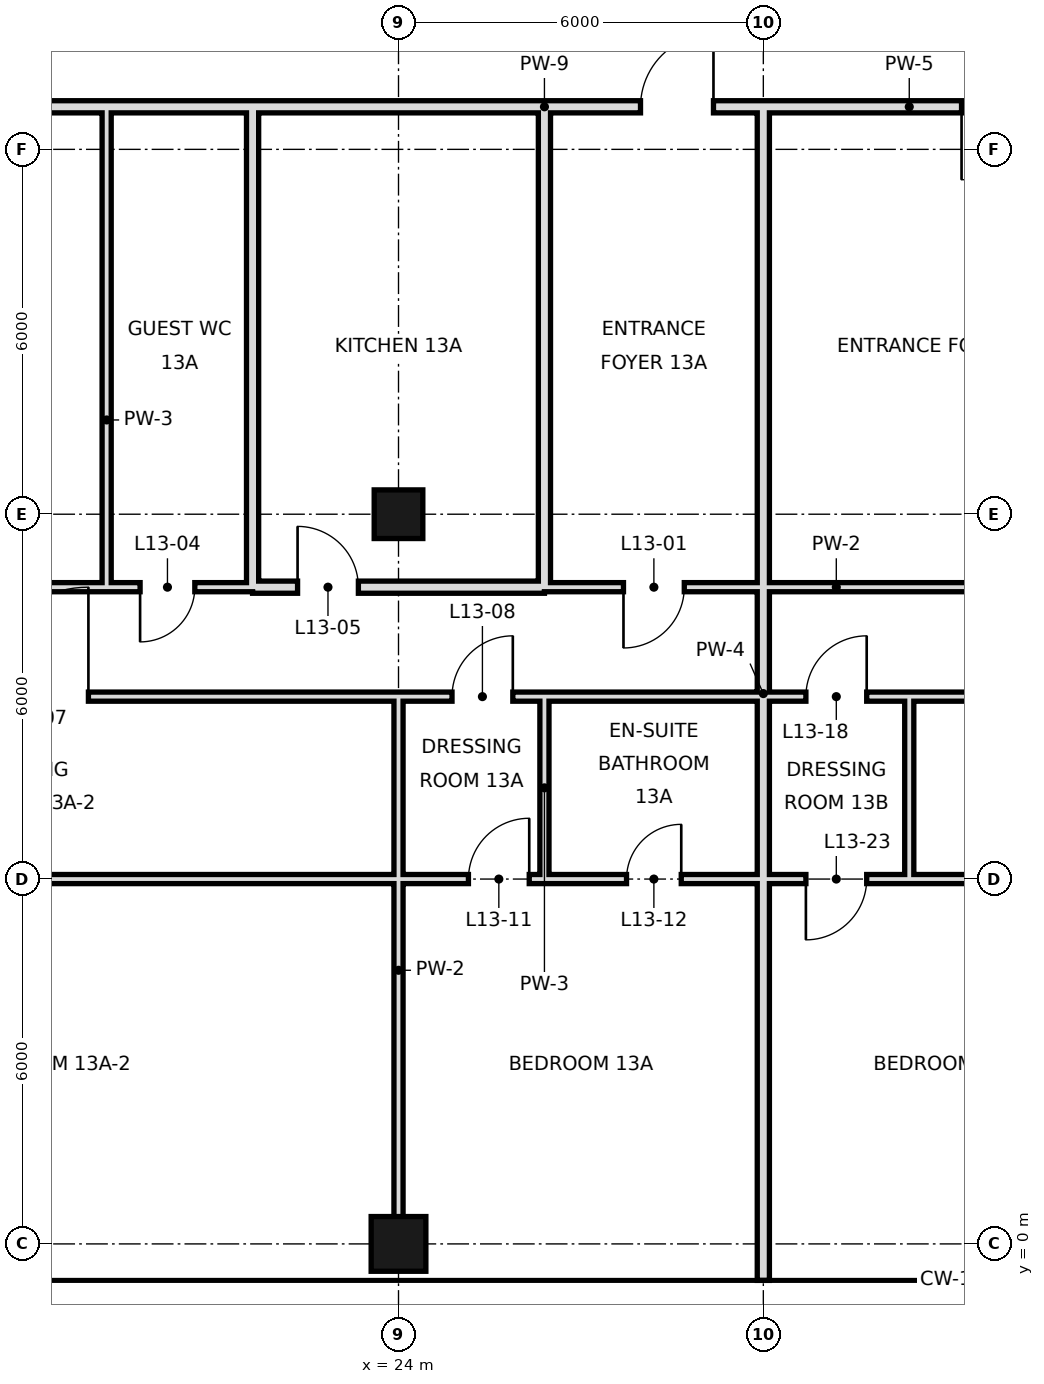
"""IFC4 building model, lengths in metres.
Left out: names, types, materials, properties, quantities, classifications, styles, units other than length and angle.
Written with IfcOpenShell. Run it as: python <this file> out.ifc"""

import sys

from ifc_helpers import new_model, si_unit, direction, frame, frame_2d, origin, origin_2d, place, context, subcontext, project, spatial, rectangle, hollow_rectangle, extrude, element, fill, save


model = new_model("IFC4")
c1 = context("Model", 3, precision=1e-05, world=origin(), true_north=direction((0.0, 1.0)))
c2 = subcontext(c1, "Body", "Model", "MODEL_VIEW")
j1 = project(units=[si_unit("LENGTHUNIT", "METRE"), si_unit("PLANEANGLEUNIT", "RADIAN")], contexts=[c1])
p1 = place(None, origin())
s1 = spatial("IfcSite", under=j1, at=p1, CompositionType="ELEMENT")
p2 = place(p1, origin())
s2 = spatial("IfcBuilding", under=s1, at=p2, CompositionType="ELEMENT")
p3 = place(p2, frame((0.0, 0.0, 67.8)))
s3 = spatial("IfcBuildingStorey", under=s2, at=p3, CompositionType="ELEMENT", Elevation=67.8)
p4 = place(p3, frame((24.0, 0.0, 0.0), z_axis=(0.0, 0.0, 1.0), x_axis=(1.0, 0.0, 0.0)))
e1 = element("IfcColumn", 1, at=p4, inside=s3, PredefinedType="COLUMN", context=c2, shape_type="SweptSolid", body=[
    extrude(hollow_rectangle(XDim=0.9, YDim=0.9, WallThickness=0.045, at=origin_2d()), origin(), (0.0, 0.0, 1.0), 3.6),
])
p5 = place(p3, frame((24.0, 12.0, 0.0), z_axis=(0.0, 0.0, 1.0), x_axis=(1.0, 0.0, 0.0)))
e2 = element("IfcColumn", 2, at=p5, inside=s3, PredefinedType="COLUMN", context=c2, shape_type="SweptSolid", body=[
    extrude(hollow_rectangle(XDim=0.8, YDim=0.8, WallThickness=0.04, at=origin_2d()), origin(), (0.0, 0.0, 1.0), 3.6),
])
p6 = place(p3, frame((19.2, 10.8, 0.0), z_axis=(0.0, 0.0, 1.0), x_axis=(0.0, 1.0, 0.0)))
e3 = element("IfcWall", 3, at=p6, inside=s3, PredefinedType="PARTITIONING", context=c2, shape_type="SweptSolid", body=[
    extrude(rectangle(XDim=7.9, YDim=0.15, at=frame_2d((3.95, 0.0))), origin(), (0.0, 0.0, 1.0), 3.42),
])
p7 = place(p3, frame((21.6, 10.8, 0.0), z_axis=(0.0, 0.0, 1.0), x_axis=(0.0, 1.0, 0.0)))
e4 = element("IfcWall", 4, at=p7, inside=s3, PredefinedType="SOLIDWALL", context=c2, shape_type="SweptSolid", body=[
    extrude(rectangle(XDim=7.9, YDim=0.2, at=frame_2d((3.95, 0.0))), origin(), (0.0, 0.0, 1.0), 2.72),
])
p8 = place(p3, frame((24.0, 0.0, 0.0), z_axis=(0.0, 0.0, 1.0), x_axis=(0.0, 1.0, 0.0)))
e5 = element("IfcWall", 5, at=p8, inside=s3, PredefinedType="PARTITIONING", context=c2, shape_type="SweptSolid", body=[
    extrude(rectangle(XDim=9.0, YDim=0.15, at=frame_2d((4.5, 0.0))), origin(), (0.0, 0.0, 1.0), 2.72),
])
p9 = place(p3, frame((26.4, 10.8, 0.0), z_axis=(0.0, 0.0, 1.0), x_axis=(0.0, 1.0, 0.0)))
e6 = element("IfcWall", 6, at=p9, inside=s3, PredefinedType="SOLIDWALL", context=c2, shape_type="SweptSolid", body=[
    extrude(rectangle(XDim=7.9, YDim=0.2, at=frame_2d((3.95, 0.0))), origin(), (0.0, 0.0, 1.0), 2.72),
])
p10 = place(p3, frame((26.4, 6.0, 0.0), z_axis=(0.0, 0.0, 1.0), x_axis=(0.0, 1.0, 0.0)))
e7 = element("IfcWall", 7, at=p10, inside=s3, PredefinedType="PARTITIONING", context=c2, shape_type="SweptSolid", body=[
    extrude(rectangle(XDim=3.0, YDim=0.15, at=frame_2d((1.5, 0.0))), origin(), (0.0, 0.0, 1.0), 3.42),
])
p11 = place(p3, frame((30.0, -0.6, 0.0), z_axis=(0.0, 0.0, 1.0), x_axis=(0.0, 1.0, 0.0)))
e8 = element("IfcWall", 8, at=p11, inside=s3, PredefinedType="SOLIDWALL", context=c2, shape_type="SweptSolid", body=[
    extrude(rectangle(XDim=19.3, YDim=0.2, at=frame_2d((9.65, 0.0))), origin(), (0.0, 0.0, 1.0), 2.72),
])
p12 = place(p3, frame((32.4, 6.0, 0.0), z_axis=(0.0, 0.0, 1.0), x_axis=(0.0, 1.0, 0.0)))
e9 = element("IfcWall", 9, at=p12, inside=s3, PredefinedType="PARTITIONING", context=c2, shape_type="SweptSolid", body=[
    extrude(rectangle(XDim=3.0, YDim=0.15, at=frame_2d((1.5, 0.0))), origin(), (0.0, 0.0, 1.0), 3.42),
])
p13 = place(p3, frame((21.6, 10.8, 0.0), z_axis=(0.0, 0.0, 1.0), x_axis=(1.0, 0.0, 0.0)))
e10 = element("IfcWall", 10, at=p13, inside=s3, PredefinedType="SOLIDWALL", context=c2, shape_type="SweptSolid", body=[
    extrude(rectangle(XDim=4.8, YDim=0.2, at=frame_2d((2.4, 0.0))), origin(), (0.0, 0.0, 1.0), 2.72),
])
p14 = place(p13, frame((0.74, 0.0, 0.0)))
e11 = element("IfcOpeningElement", 11, at=p14, cuts=e10, PredefinedType="OPENING", context=c2, shape_type="SweptSolid", body=[
    extrude(rectangle(XDim=1.0, YDim=2.4, at=frame_2d((0.5, 1.2))), frame((0.0, 0.11, 0.0), z_axis=(0.0, -1.0, 0.0), x_axis=(1.0, 0.0, 0.0)), (0.0, 0.0, 1.0), 0.22),
])
p15 = place(p3, frame((-0.6, 10.8, 0.0), z_axis=(0.0, 0.0, 1.0), x_axis=(1.0, 0.0, 0.0)))
e12 = element("IfcWall", 12, at=p15, inside=s3, PredefinedType="PARTITIONING", context=c2, shape_type="SweptSolid", body=[
    extrude(rectangle(XDim=19.8, YDim=0.15, at=frame_2d((9.9, 0.0))), origin(), (0.0, 0.0, 1.0), 3.42),
])
p16 = place(p15, frame((3.64, 0.0, 0.0)))
e13 = element("IfcOpeningElement", 13, at=p16, cuts=e12, PredefinedType="OPENING", context=c2, shape_type="SweptSolid", body=[
    extrude(rectangle(XDim=1.0, YDim=2.4, at=frame_2d((0.5, 1.2))), frame((0.0, 0.085, 0.0), z_axis=(0.0, -1.0, 0.0), x_axis=(1.0, 0.0, 0.0)), (0.0, 0.0, 1.0), 0.17),
])
p17 = place(p15, frame((16.48, 0.0, 0.0)))
e14 = element("IfcOpeningElement", 14, at=p17, cuts=e12, PredefinedType="OPENING", context=c2, shape_type="SweptSolid", body=[
    extrude(rectangle(XDim=1.0, YDim=2.4, at=frame_2d((0.5, 1.2))), frame((0.0, 0.085, 0.0), z_axis=(0.0, -1.0, 0.0), x_axis=(1.0, 0.0, 0.0)), (0.0, 0.0, 1.0), 0.17),
])
p18 = place(p3, frame((26.4, 10.8, 0.0), z_axis=(0.0, 0.0, 1.0), x_axis=(1.0, 0.0, 0.0)))
e15 = element("IfcWall", 15, at=p18, inside=s3, PredefinedType="PARTITIONING", context=c2, shape_type="SweptSolid", body=[
    extrude(rectangle(XDim=9.6, YDim=0.15, at=frame_2d((4.8, 0.0))), origin(), (0.0, 0.0, 1.0), 3.42),
])
p19 = place(p18, frame((1.3, 0.0, 0.0)))
e16 = element("IfcOpeningElement", 16, at=p19, cuts=e15, PredefinedType="OPENING", context=c2, shape_type="SweptSolid", body=[
    extrude(rectangle(XDim=1.0, YDim=2.4, at=frame_2d((0.5, 1.2))), frame((0.0, 0.085, 0.0), z_axis=(0.0, -1.0, 0.0), x_axis=(1.0, 0.0, 0.0)), (0.0, 0.0, 1.0), 0.17),
])
p20 = place(p18, frame((7.0, 0.0, 0.0)))
e17 = element("IfcOpeningElement", 17, at=p20, cuts=e15, PredefinedType="OPENING", context=c2, shape_type="SweptSolid", body=[
    extrude(rectangle(XDim=1.0, YDim=2.4, at=frame_2d((0.5, 1.2))), frame((0.0, 0.085, 0.0), z_axis=(0.0, -1.0, 0.0), x_axis=(1.0, 0.0, 0.0)), (0.0, 0.0, 1.0), 0.17),
])
p21 = place(p3, frame((19.2, 10.8, 0.0), z_axis=(0.0, 0.0, 1.0), x_axis=(1.0, 0.0, 0.0)))
e18 = element("IfcWall", 18, at=p21, inside=s3, PredefinedType="PARTITIONING", context=c2, shape_type="SweptSolid", body=[
    extrude(rectangle(XDim=2.4, YDim=0.15, at=frame_2d((1.2, 0.0))), origin(), (0.0, 0.0, 1.0), 3.42),
])
p22 = place(p21, frame((0.55, 0.0, 0.0)))
e19 = element("IfcOpeningElement", 19, at=p22, cuts=e18, PredefinedType="OPENING", context=c2, shape_type="SweptSolid", body=[
    extrude(rectangle(XDim=0.9, YDim=2.4, at=frame_2d((0.45, 1.2))), frame((0.0, 0.085, 0.0), z_axis=(0.0, -1.0, 0.0), x_axis=(1.0, 0.0, 0.0)), (0.0, 0.0, 1.0), 0.17),
])
p23 = place(p3, frame((3.1, 18.7, 0.0), z_axis=(0.0, 0.0, 1.0), x_axis=(1.0, 0.0, 0.0)))
e20 = element("IfcWall", 20, at=p23, inside=s3, PredefinedType="SOLIDWALL", context=c2, shape_type="SweptSolid", body=[
    extrude(rectangle(XDim=18.5, YDim=0.2, at=frame_2d((9.25, 0.0))), origin(), (0.0, 0.0, 1.0), 2.72),
])
p24 = place(p3, frame((26.4, 18.7, 0.0), z_axis=(0.0, 0.0, 1.0), x_axis=(1.0, 0.0, 0.0)))
e21 = element("IfcWall", 21, at=p24, inside=s3, PredefinedType="SOLIDWALL", context=c2, shape_type="SweptSolid", body=[
    extrude(rectangle(XDim=12.0, YDim=0.2, at=frame_2d((6.0, 0.0))), origin(), (0.0, 0.0, 1.0), 2.72),
])
p25 = place(p24, frame((1.58, 0.0, 0.0)))
e22 = element("IfcOpeningElement", 22, at=p25, cuts=e21, PredefinedType="OPENING", context=c2, shape_type="SweptSolid", body=[
    extrude(rectangle(XDim=1.2, YDim=2.4, at=frame_2d((0.6, 1.2))), frame((0.0, 0.11, 0.0), z_axis=(0.0, -1.0, 0.0), x_axis=(1.0, 0.0, 0.0)), (0.0, 0.0, 1.0), 0.22),
])
p26 = place(p24, frame((6.86, 0.0, 0.0)))
e23 = element("IfcOpeningElement", 23, at=p26, cuts=e21, PredefinedType="OPENING", context=c2, shape_type="SweptSolid", body=[
    extrude(rectangle(XDim=1.2, YDim=2.4, at=frame_2d((0.6, 1.2))), frame((0.0, 0.11, 0.0), z_axis=(0.0, -1.0, 0.0), x_axis=(1.0, 0.0, 0.0)), (0.0, 0.0, 1.0), 0.22),
])
p27 = place(p3, frame((21.6, 18.7, 0.0), z_axis=(0.0, 0.0, 1.0), x_axis=(1.0, 0.0, 0.0)))
e24 = element("IfcWall", 24, at=p27, inside=s3, PredefinedType="SOLIDWALL", context=c2, shape_type="SweptSolid", body=[
    extrude(rectangle(XDim=4.8, YDim=0.2, at=frame_2d((2.4, 0.0))), origin(), (0.0, 0.0, 1.0), 3.42),
])
p28 = place(p3, frame((0.0, 6.0, 0.0), z_axis=(0.0, 0.0, 1.0), x_axis=(1.0, 0.0, 0.0)))
e25 = element("IfcWall", 25, at=p28, inside=s3, PredefinedType="PARTITIONING", context=c2, shape_type="SweptSolid", body=[
    extrude(rectangle(XDim=26.4, YDim=0.15, at=frame_2d((13.2, 0.0))), origin(), (0.0, 0.0, 1.0), 2.97),
])
p29 = place(p28, frame((5.1, 0.0, 0.0)))
e26 = element("IfcOpeningElement", 26, at=p29, cuts=e25, PredefinedType="OPENING", context=c2, shape_type="SweptSolid", body=[
    extrude(rectangle(XDim=1.8, YDim=2.4, at=frame_2d((0.9, 1.2))), frame((0.0, 0.085, 0.0), z_axis=(0.0, -1.0, 0.0), x_axis=(1.0, 0.0, 0.0)), (0.0, 0.0, 1.0), 0.17),
])
p30 = place(p28, frame((12.25, 0.0, 0.0)))
e27 = element("IfcOpeningElement", 27, at=p30, cuts=e25, PredefinedType="OPENING", context=c2, shape_type="SweptSolid", body=[
    extrude(rectangle(XDim=1.8, YDim=2.4, at=frame_2d((0.9, 1.2))), frame((0.0, 0.085, 0.0), z_axis=(0.0, -1.0, 0.0), x_axis=(1.0, 0.0, 0.0)), (0.0, 0.0, 1.0), 0.17),
])
p31 = place(p28, frame((25.15, 0.0, 0.0)))
e28 = element("IfcOpeningElement", 28, at=p31, cuts=e25, PredefinedType="OPENING", context=c2, shape_type="SweptSolid", body=[
    extrude(rectangle(XDim=1.0, YDim=2.4, at=frame_2d((0.5, 1.2))), frame((0.0, 0.085, 0.0), z_axis=(0.0, -1.0, 0.0), x_axis=(1.0, 0.0, 0.0)), (0.0, 0.0, 1.0), 0.17),
])
p32 = place(p3, frame((30.0, 6.0, 0.0), z_axis=(0.0, 0.0, 1.0), x_axis=(1.0, 0.0, 0.0)))
e29 = element("IfcWall", 29, at=p32, inside=s3, PredefinedType="PARTITIONING", context=c2, shape_type="SweptSolid", body=[
    extrude(rectangle(XDim=2.4, YDim=0.15, at=frame_2d((1.2, 0.0))), origin(), (0.0, 0.0, 1.0), 2.97),
])
p33 = place(p32, frame((0.7, 0.0, 0.0)))
e30 = element("IfcOpeningElement", 30, at=p33, cuts=e29, PredefinedType="OPENING", context=c2, shape_type="SweptSolid", body=[
    extrude(rectangle(XDim=1.0, YDim=2.4, at=frame_2d((0.5, 1.2))), frame((0.0, 0.085, 0.0), z_axis=(0.0, -1.0, 0.0), x_axis=(1.0, 0.0, 0.0)), (0.0, 0.0, 1.0), 0.17),
])
p34 = place(p3, frame((26.4, 6.0, 0.0), z_axis=(0.0, 0.0, 1.0), x_axis=(1.0, 0.0, 0.0)))
e31 = element("IfcWall", 31, at=p34, inside=s3, PredefinedType="PARTITIONING", context=c2, shape_type="SweptSolid", body=[
    extrude(rectangle(XDim=3.6, YDim=0.15, at=frame_2d((1.8, 0.0))), origin(), (0.0, 0.0, 1.0), 2.97),
])
p35 = place(p34, frame((1.35, 0.0, 0.0)))
e32 = element("IfcOpeningElement", 32, at=p35, cuts=e31, PredefinedType="OPENING", context=c2, shape_type="SweptSolid", body=[
    extrude(rectangle(XDim=0.9, YDim=2.4, at=frame_2d((0.45, 1.2))), frame((0.0, 0.085, 0.0), z_axis=(0.0, -1.0, 0.0), x_axis=(1.0, 0.0, 0.0)), (0.0, 0.0, 1.0), 0.17),
])
p36 = place(p3, frame((32.4, 6.0, 0.0), z_axis=(0.0, 0.0, 1.0), x_axis=(1.0, 0.0, 0.0)))
e33 = element("IfcWall", 33, at=p36, inside=s3, PredefinedType="PARTITIONING", context=c2, shape_type="SweptSolid", body=[
    extrude(rectangle(XDim=3.6, YDim=0.15, at=frame_2d((1.8, 0.0))), origin(), (0.0, 0.0, 1.0), 2.97),
])
p37 = place(p36, frame((1.79, 0.0, 0.0)))
e34 = element("IfcOpeningElement", 34, at=p37, cuts=e33, PredefinedType="OPENING", context=c2, shape_type="SweptSolid", body=[
    extrude(rectangle(XDim=0.9, YDim=2.4, at=frame_2d((0.45, 1.2))), frame((0.0, 0.085, 0.0), z_axis=(0.0, -1.0, 0.0), x_axis=(1.0, 0.0, 0.0)), (0.0, 0.0, 1.0), 0.17),
])
p38 = place(p3, frame((-0.6, 9.0, 0.0), z_axis=(0.0, 0.0, 1.0), x_axis=(1.0, 0.0, 0.0)))
e35 = element("IfcWall", 35, at=p38, inside=s3, PredefinedType="PARTITIONING", context=c2, shape_type="SweptSolid", body=[
    extrude(rectangle(XDim=27.0, YDim=0.15, at=frame_2d((13.5, 0.0))), origin(), (0.0, 0.0, 1.0), 3.42),
])
p39 = place(p38, frame((5.7, 0.0, 0.0)))
e36 = element("IfcOpeningElement", 36, at=p39, cuts=e35, PredefinedType="OPENING", context=c2, shape_type="SweptSolid", body=[
    extrude(rectangle(XDim=1.8, YDim=2.4, at=frame_2d((0.9, 1.2))), frame((0.0, 0.085, 0.0), z_axis=(0.0, -1.0, 0.0), x_axis=(1.0, 0.0, 0.0)), (0.0, 0.0, 1.0), 0.17),
])
p40 = place(p38, frame((17.7, 0.0, 0.0)))
e37 = element("IfcOpeningElement", 37, at=p40, cuts=e35, PredefinedType="OPENING", context=c2, shape_type="SweptSolid", body=[
    extrude(rectangle(XDim=1.8, YDim=2.4, at=frame_2d((0.9, 1.2))), frame((0.0, 0.085, 0.0), z_axis=(0.0, -1.0, 0.0), x_axis=(1.0, 0.0, 0.0)), (0.0, 0.0, 1.0), 0.17),
])
p41 = place(p38, frame((25.48, 0.0, 0.0)))
e38 = element("IfcOpeningElement", 38, at=p41, cuts=e35, PredefinedType="OPENING", context=c2, shape_type="SweptSolid", body=[
    extrude(rectangle(XDim=1.0, YDim=2.4, at=frame_2d((0.5, 1.2))), frame((0.0, 0.085, 0.0), z_axis=(0.0, -1.0, 0.0), x_axis=(1.0, 0.0, 0.0)), (0.0, 0.0, 1.0), 0.17),
])
p42 = place(p3, frame((30.0, 9.0, 0.0), z_axis=(0.0, 0.0, 1.0), x_axis=(1.0, 0.0, 0.0)))
e39 = element("IfcWall", 39, at=p42, inside=s3, PredefinedType="PARTITIONING", context=c2, shape_type="SweptSolid", body=[
    extrude(rectangle(XDim=2.4, YDim=0.15, at=frame_2d((1.2, 0.0))), origin(), (0.0, 0.0, 1.0), 3.42),
])
p43 = place(p42, frame((0.7, 0.0, 0.0)))
e40 = element("IfcOpeningElement", 40, at=p43, cuts=e39, PredefinedType="OPENING", context=c2, shape_type="SweptSolid", body=[
    extrude(rectangle(XDim=1.0, YDim=2.4, at=frame_2d((0.5, 1.2))), frame((0.0, 0.085, 0.0), z_axis=(0.0, -1.0, 0.0), x_axis=(1.0, 0.0, 0.0)), (0.0, 0.0, 1.0), 0.17),
])
for number, where, z_axis, x_axis in (
    (41, (26.4, 9.0, 0.0), (0.0, 0.0, 1.0), (1.0, 0.0, 0.0)),
    (42, (32.4, 9.0, 0.0), (0.0, 0.0, 1.0), (1.0, 0.0, 0.0)),
):
    element("IfcWall", number, at=place(p3, frame(where, z_axis=z_axis, x_axis=x_axis)), inside=s3, PredefinedType="PARTITIONING", context=c2, shape_type="SweptSolid", body=[
        extrude(rectangle(XDim=3.6, YDim=0.15, at=frame_2d((1.8, 0.0))), origin(), (0.0, 0.0, 1.0), 3.42),
    ])
p44 = place(p19, frame((1.0, 0.0, 0.0), z_axis=(0.0, 0.0, 1.0), x_axis=(-1.0, 0.0, 0.0)))
e43 = element("IfcDoor", 43, at=p44, inside=s3, OperationType="SINGLE_SWING_RIGHT", PredefinedType="DOOR", context=c2, shape_type="SweptSolid", body=[
    extrude(rectangle(XDim=1.0, YDim=2.4, at=frame_2d((0.5, 1.2))), frame((0.0, 0.025, 0.0), z_axis=(0.0, -1.0, 0.0), x_axis=(1.0, 0.0, 0.0)), (0.0, 0.0, 1.0), 0.05),
])
fill(e16, e43)
p45 = place(p22, frame((0.9, 0.0, 0.0), z_axis=(0.0, 0.0, 1.0), x_axis=(-1.0, 0.0, 0.0)))
e44 = element("IfcDoor", 44, at=p45, inside=s3, OperationType="SINGLE_SWING_RIGHT", PredefinedType="DOOR", context=c2, shape_type="SweptSolid", body=[
    extrude(rectangle(XDim=0.9, YDim=2.4, at=frame_2d((0.45, 1.2))), frame((0.0, 0.025, 0.0), z_axis=(0.0, -1.0, 0.0), x_axis=(1.0, 0.0, 0.0)), (0.0, 0.0, 1.0), 0.05),
])
fill(e19, e44)
p46 = place(p14, origin())
e45 = element("IfcDoor", 45, at=p46, inside=s3, OperationType="SINGLE_SWING_LEFT", PredefinedType="DOOR", context=c2, shape_type="SweptSolid", body=[
    extrude(rectangle(XDim=1.0, YDim=2.4, at=frame_2d((0.5, 1.2))), frame((0.0, 0.025, 0.0), z_axis=(0.0, -1.0, 0.0), x_axis=(1.0, 0.0, 0.0)), (0.0, 0.0, 1.0), 0.05),
])
fill(e11, e45)
p47 = place(p40, frame((1.8, 0.0, 0.0), z_axis=(0.0, 0.0, 1.0), x_axis=(-1.0, 0.0, 0.0)))
e46 = element("IfcDoor", 46, at=p47, inside=s3, OperationType="SINGLE_SWING_LEFT", PredefinedType="DOOR", context=c2, shape_type="SweptSolid", body=[
    extrude(rectangle(XDim=1.8, YDim=2.4, at=frame_2d((0.9, 1.2))), frame((0.0, 0.025, 0.0), z_axis=(0.0, -1.0, 0.0), x_axis=(1.0, 0.0, 0.0)), (0.0, 0.0, 1.0), 0.05),
])
fill(e37, e46)
p48 = place(p41, frame((1.0, 0.0, 0.0), z_axis=(0.0, 0.0, 1.0), x_axis=(-1.0, 0.0, 0.0)))
e47 = element("IfcDoor", 47, at=p48, inside=s3, OperationType="SINGLE_SWING_LEFT", PredefinedType="DOOR", context=c2, shape_type="SweptSolid", body=[
    extrude(rectangle(XDim=1.0, YDim=2.4, at=frame_2d((0.5, 1.2))), frame((0.0, 0.025, 0.0), z_axis=(0.0, -1.0, 0.0), x_axis=(1.0, 0.0, 0.0)), (0.0, 0.0, 1.0), 0.05),
])
fill(e38, e47)
p49 = place(p31, frame((1.0, 0.0, 0.0), z_axis=(0.0, 0.0, 1.0), x_axis=(-1.0, 0.0, 0.0)))
e48 = element("IfcDoor", 48, at=p49, inside=s3, OperationType="SINGLE_SWING_LEFT", PredefinedType="DOOR", context=c2, shape_type="SweptSolid", body=[
    extrude(rectangle(XDim=1.0, YDim=2.4, at=frame_2d((0.5, 1.2))), frame((0.0, 0.025, 0.0), z_axis=(0.0, -1.0, 0.0), x_axis=(1.0, 0.0, 0.0)), (0.0, 0.0, 1.0), 0.05),
])
fill(e28, e48)
p50 = place(p35, frame((0.9, 0.0, 0.0), z_axis=(0.0, 0.0, 1.0), x_axis=(-1.0, 0.0, 0.0)))
e49 = element("IfcDoor", 49, at=p50, inside=s3, OperationType="SINGLE_SWING_LEFT", PredefinedType="DOOR", context=c2, shape_type="SweptSolid", body=[
    extrude(rectangle(XDim=0.9, YDim=2.4, at=frame_2d((0.45, 1.2))), frame((0.0, 0.025, 0.0), z_axis=(0.0, -1.0, 0.0), x_axis=(1.0, 0.0, 0.0)), (0.0, 0.0, 1.0), 0.05),
])
fill(e32, e49)
p51 = place(p43, frame((1.0, 0.0, 0.0), z_axis=(0.0, 0.0, 1.0), x_axis=(-1.0, 0.0, 0.0)))
e50 = element("IfcDoor", 50, at=p51, inside=s3, OperationType="SINGLE_SWING_LEFT", PredefinedType="DOOR", context=c2, shape_type="SweptSolid", body=[
    extrude(rectangle(XDim=1.0, YDim=2.4, at=frame_2d((0.5, 1.2))), frame((0.0, 0.025, 0.0), z_axis=(0.0, -1.0, 0.0), x_axis=(1.0, 0.0, 0.0)), (0.0, 0.0, 1.0), 0.05),
])
fill(e40, e50)
p52 = place(p33, frame((1.0, 0.0, 0.0), z_axis=(0.0, 0.0, 1.0), x_axis=(-1.0, 0.0, 0.0)))
e51 = element("IfcDoor", 51, at=p52, inside=s3, OperationType="SINGLE_SWING_RIGHT", PredefinedType="DOOR", context=c2, shape_type="SweptSolid", body=[
    extrude(rectangle(XDim=1.0, YDim=2.4, at=frame_2d((0.5, 1.2))), frame((0.0, 0.025, 0.0), z_axis=(0.0, -1.0, 0.0), x_axis=(1.0, 0.0, 0.0)), (0.0, 0.0, 1.0), 0.05),
])
fill(e30, e51)
p53 = place(p25, frame((1.2, 0.0, 0.0), z_axis=(0.0, 0.0, 1.0), x_axis=(-1.0, 0.0, 0.0)))
e52 = element("IfcDoor", 52, at=p53, inside=s3, OperationType="SINGLE_SWING_LEFT", PredefinedType="DOOR", context=c2, shape_type="SweptSolid", body=[
    extrude(rectangle(XDim=1.2, YDim=2.4, at=frame_2d((0.6, 1.2))), frame((0.0, 0.025, 0.0), z_axis=(0.0, -1.0, 0.0), x_axis=(1.0, 0.0, 0.0)), (0.0, 0.0, 1.0), 0.05),
])
fill(e22, e52)
p54 = place(p26, frame((1.2, 0.0, 0.0), z_axis=(0.0, 0.0, 1.0), x_axis=(-1.0, 0.0, 0.0)))
e53 = element("IfcDoor", 53, at=p54, inside=s3, OperationType="SINGLE_SWING_RIGHT", PredefinedType="DOOR", context=c2, shape_type="SweptSolid", body=[
    extrude(rectangle(XDim=1.2, YDim=2.4, at=frame_2d((0.6, 1.2))), frame((0.0, 0.025, 0.0), z_axis=(0.0, -1.0, 0.0), x_axis=(1.0, 0.0, 0.0)), (0.0, 0.0, 1.0), 0.05),
])
fill(e23, e53)
save(model, sys.argv[1])
